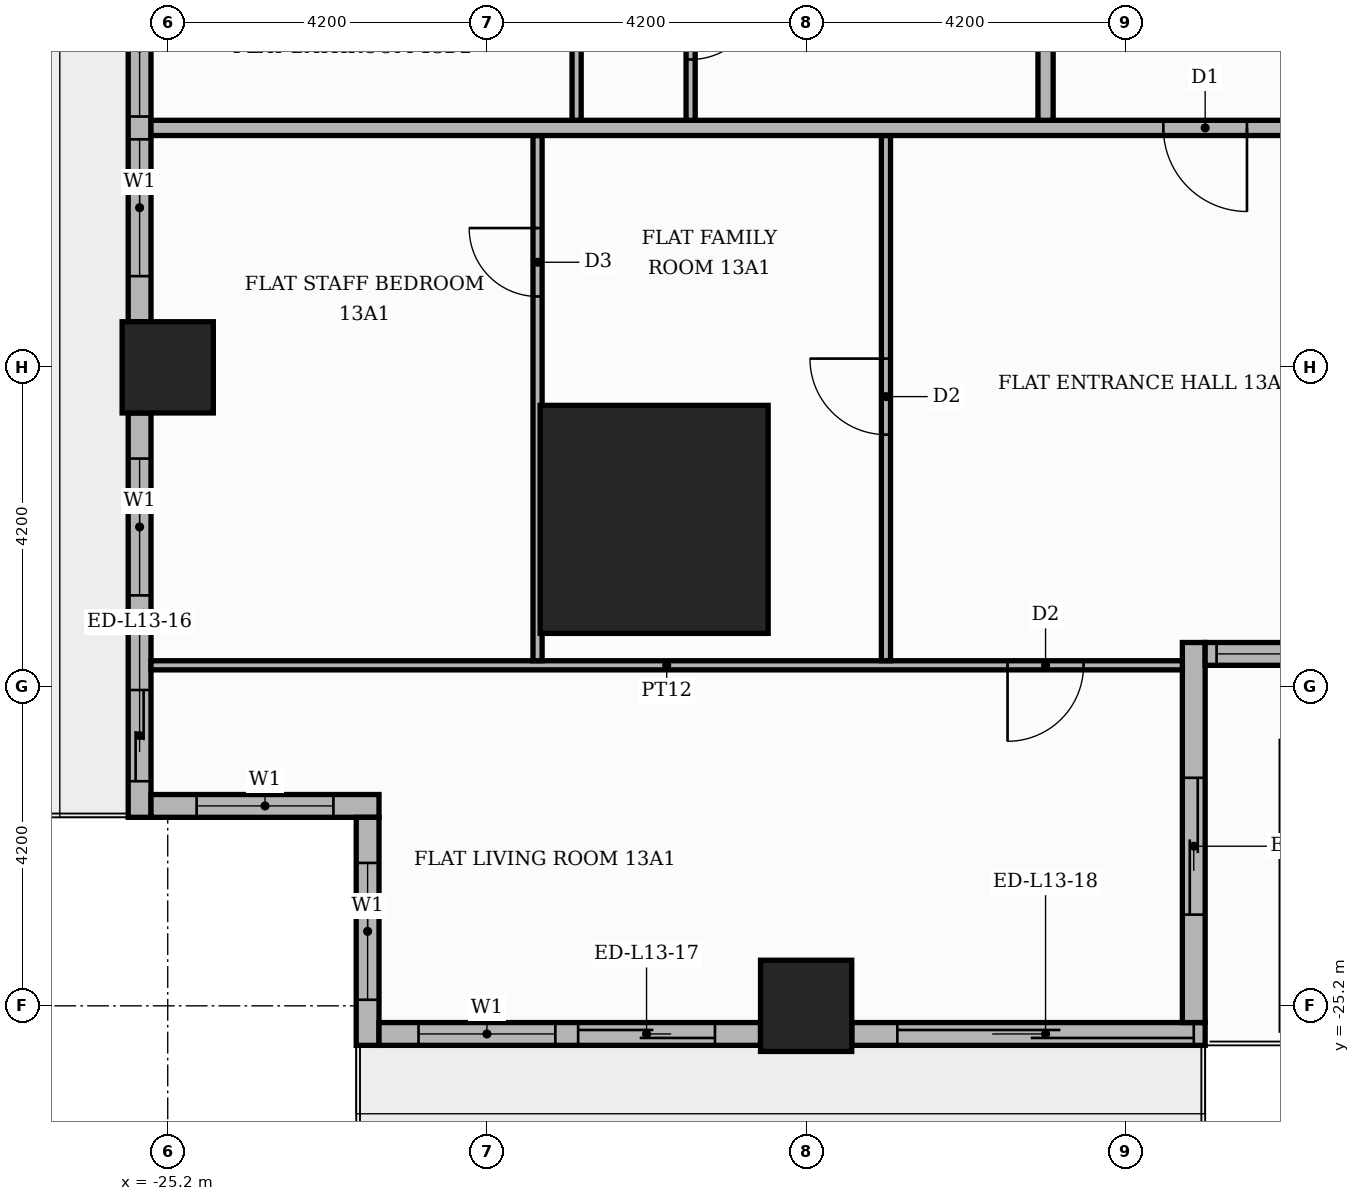
"""IFC4 building model, lengths in metres.
Left out: names, types, materials, properties, quantities, classifications, styles, units other than length and angle.
Written with IfcOpenShell. Run it as: python <this file> out.ifc"""

import sys

from ifc_helpers import new_model, si_unit, direction, frame, frame_2d, origin, origin_2d, place, context, subcontext, project, spatial, rectangle, extrude, element, fill, save


model = new_model("IFC4")
c1 = context("Model", 3, precision=1e-05, world=origin(), true_north=direction((0.0, 1.0)))
c2 = subcontext(c1, "Body", "Model", "MODEL_VIEW")
j1 = project(units=[si_unit("LENGTHUNIT", "METRE"), si_unit("PLANEANGLEUNIT", "RADIAN")], contexts=[c1])
p1 = place(None, origin())
s1 = spatial("IfcSite", under=j1, at=p1, CompositionType="ELEMENT")
p2 = place(p1, origin())
s2 = spatial("IfcBuilding", under=s1, at=p2, CompositionType="ELEMENT")
p3 = place(p2, frame((0.0, 0.0, 58.2)))
s3 = spatial("IfcBuildingStorey", under=s2, at=p3, CompositionType="ELEMENT", Elevation=58.2)
p4 = place(p3, frame((-18.8, -18.8, 0.0), z_axis=(0.0, 0.0, 1.0), x_axis=(1.0, 0.0, 0.0)))
e1 = element("IfcColumn", 1, at=p4, inside=s3, PredefinedType="COLUMN", context=c2, shape_type="SweptSolid", body=[
    extrude(rectangle(XDim=3.0, YDim=3.0, at=origin_2d()), origin(), (0.0, 0.0, 1.0), 3.9),
])
for number, where, z_axis, x_axis in (
    (2, (-16.8, -25.2, 0.0), (0.0, 0.0, 1.0), (1.0, 0.0, 0.0)),
    (3, (-25.2, -16.8, 0.0), (0.0, 0.0, 1.0), (1.0, 0.0, 0.0)),
):
    element("IfcColumn", number, at=place(p3, frame(where, z_axis=z_axis, x_axis=x_axis)), inside=s3, PredefinedType="COLUMN", context=c2, shape_type="SweptSolid", body=[
        extrude(rectangle(XDim=1.2, YDim=1.2, at=origin_2d()), origin(), (0.0, 0.0, 1.0), 3.9),
    ])
p5 = place(p3, frame((-25.57, -9.0, 0.0), z_axis=(0.0, 0.0, 1.0), x_axis=(0.0, -1.0, 0.0)))
e4 = element("IfcWall", 4, at=p5, inside=s3, PredefinedType="STANDARD", context=c2, shape_type="SweptSolid", body=[
    extrude(rectangle(XDim=7.2, YDim=0.3, at=frame_2d((3.6, 0.0))), origin(), (0.0, 0.0, 1.0), 3.48),
])
p6 = place(p5, frame((0.6, 0.0, 0.9)))
e5 = element("IfcOpeningElement", 5, at=p6, cuts=e4, PredefinedType="OPENING", context=c2, shape_type="SweptSolid", body=[
    extrude(rectangle(XDim=1.8, YDim=2.1, at=frame_2d((0.9, 1.05))), frame((0.0, 0.16, 0.0), z_axis=(0.0, -1.0, 0.0), x_axis=(1.0, 0.0, 0.0)), (0.0, 0.0, 1.0), 0.32),
])
p7 = place(p5, frame((2.7, 0.0, 0.9)))
e6 = element("IfcOpeningElement", 6, at=p7, cuts=e4, PredefinedType="OPENING", context=c2, shape_type="SweptSolid", body=[
    extrude(rectangle(XDim=1.8, YDim=2.1, at=frame_2d((0.9, 1.05))), frame((0.0, 0.16, 0.0), z_axis=(0.0, -1.0, 0.0), x_axis=(1.0, 0.0, 0.0)), (0.0, 0.0, 1.0), 0.32),
])
p8 = place(p5, frame((4.8, 0.0, 0.9)))
e7 = element("IfcOpeningElement", 7, at=p8, cuts=e4, PredefinedType="OPENING", context=c2, shape_type="SweptSolid", body=[
    extrude(rectangle(XDim=1.8, YDim=2.1, at=frame_2d((0.9, 1.05))), frame((0.0, 0.16, 0.0), z_axis=(0.0, -1.0, 0.0), x_axis=(1.0, 0.0, 0.0)), (0.0, 0.0, 1.0), 0.32),
])
p9 = place(p3, frame((-25.57, -17.4, 0.0), z_axis=(0.0, 0.0, 1.0), x_axis=(0.0, -1.0, 0.0)))
e8 = element("IfcWall", 8, at=p9, inside=s3, PredefinedType="STANDARD", context=c2, shape_type="SweptSolid", body=[
    extrude(rectangle(XDim=5.32, YDim=0.3, at=frame_2d((2.66, 0.0))), origin(), (0.0, 0.0, 1.0), 3.48),
])
p10 = place(p9, frame((0.6, 0.0, 0.9)))
e9 = element("IfcOpeningElement", 9, at=p10, cuts=e8, PredefinedType="OPENING", context=c2, shape_type="SweptSolid", body=[
    extrude(rectangle(XDim=1.8, YDim=2.1, at=frame_2d((0.9, 1.05))), frame((0.0, 0.16, 0.0), z_axis=(0.0, -1.0, 0.0), x_axis=(1.0, 0.0, 0.0)), (0.0, 0.0, 1.0), 0.32),
])
p11 = place(p9, frame((3.645, 0.0, 0.0)))
e10 = element("IfcOpeningElement", 10, at=p11, cuts=e8, PredefinedType="OPENING", context=c2, shape_type="SweptSolid", body=[
    extrude(rectangle(XDim=1.2, YDim=2.4, at=frame_2d((0.6, 1.2))), frame((0.0, 0.16, 0.0), z_axis=(0.0, -1.0, 0.0), x_axis=(1.0, 0.0, 0.0)), (0.0, 0.0, 1.0), 0.32),
])
p12 = place(p3, frame((-25.42, -22.57, 0.0), z_axis=(0.0, 0.0, 1.0), x_axis=(1.0, 0.0, 0.0)))
e11 = element("IfcWall", 11, at=p12, inside=s3, PredefinedType="STANDARD", context=c2, shape_type="SweptSolid", body=[
    extrude(rectangle(XDim=3.0, YDim=0.3, at=frame_2d((1.5, 0.0))), origin(), (0.0, 0.0, 1.0), 3.48),
])
p13 = place(p12, frame((0.6, 0.0, 0.9)))
e12 = element("IfcOpeningElement", 12, at=p13, cuts=e11, PredefinedType="OPENING", context=c2, shape_type="SweptSolid", body=[
    extrude(rectangle(XDim=1.8, YDim=2.1, at=frame_2d((0.9, 1.05))), frame((0.0, 0.16, 0.0), z_axis=(0.0, -1.0, 0.0), x_axis=(1.0, 0.0, 0.0)), (0.0, 0.0, 1.0), 0.32),
])
p14 = place(p3, frame((-22.57, -22.72, 0.0), z_axis=(0.0, 0.0, 1.0), x_axis=(0.0, -1.0, 0.0)))
e13 = element("IfcWall", 13, at=p14, inside=s3, PredefinedType="STANDARD", context=c2, shape_type="SweptSolid", body=[
    extrude(rectangle(XDim=3.0, YDim=0.3, at=frame_2d((1.5, 0.0))), origin(), (0.0, 0.0, 1.0), 3.48),
])
p15 = place(p14, frame((0.6, 0.0, 0.9)))
e14 = element("IfcOpeningElement", 14, at=p15, cuts=e13, PredefinedType="OPENING", context=c2, shape_type="SweptSolid", body=[
    extrude(rectangle(XDim=1.8, YDim=2.1, at=frame_2d((0.9, 1.05))), frame((0.0, 0.16, 0.0), z_axis=(0.0, -1.0, 0.0), x_axis=(1.0, 0.0, 0.0)), (0.0, 0.0, 1.0), 0.32),
])
p16 = place(p3, frame((-22.42, -25.57, 0.0), z_axis=(0.0, 0.0, 1.0), x_axis=(1.0, 0.0, 0.0)))
e15 = element("IfcWall", 15, at=p16, inside=s3, PredefinedType="STANDARD", context=c2, shape_type="SweptSolid", body=[
    extrude(rectangle(XDim=5.02, YDim=0.3, at=frame_2d((2.51, 0.0))), origin(), (0.0, 0.0, 1.0), 3.48),
])
p17 = place(p16, frame((0.52, 0.0, 0.9)))
e16 = element("IfcOpeningElement", 16, at=p17, cuts=e15, PredefinedType="OPENING", context=c2, shape_type="SweptSolid", body=[
    extrude(rectangle(XDim=1.8, YDim=2.1, at=frame_2d((0.9, 1.05))), frame((0.0, 0.16, 0.0), z_axis=(0.0, -1.0, 0.0), x_axis=(1.0, 0.0, 0.0)), (0.0, 0.0, 1.0), 0.32),
])
p18 = place(p16, frame((2.62, 0.0, 0.0)))
e17 = element("IfcOpeningElement", 17, at=p18, cuts=e15, PredefinedType="OPENING", context=c2, shape_type="SweptSolid", body=[
    extrude(rectangle(XDim=1.8, YDim=2.4, at=frame_2d((0.9, 1.2))), frame((0.0, 0.16, 0.0), z_axis=(0.0, -1.0, 0.0), x_axis=(1.0, 0.0, 0.0)), (0.0, 0.0, 1.0), 0.32),
])
p19 = place(p3, frame((-16.2, -25.57, 0.0), z_axis=(0.0, 0.0, 1.0), x_axis=(1.0, 0.0, 0.0)))
e18 = element("IfcWall", 18, at=p19, inside=s3, PredefinedType="STANDARD", context=c2, shape_type="SweptSolid", body=[
    extrude(rectangle(XDim=4.65, YDim=0.3, at=frame_2d((2.325, 0.0))), origin(), (0.0, 0.0, 1.0), 3.48),
])
p20 = place(p19, frame((0.6, 0.0, 0.0)))
e19 = element("IfcOpeningElement", 19, at=p20, cuts=e18, PredefinedType="OPENING", context=c2, shape_type="SweptSolid", body=[
    extrude(rectangle(XDim=3.9, YDim=2.4, at=frame_2d((1.95, 1.2))), frame((0.0, 0.16, 0.0), z_axis=(0.0, -1.0, 0.0), x_axis=(1.0, 0.0, 0.0)), (0.0, 0.0, 1.0), 0.32),
])
p21 = place(p3, frame((-11.7, -25.42, 0.0), z_axis=(0.0, 0.0, 1.0), x_axis=(0.0, 1.0, 0.0)))
e20 = element("IfcWall", 20, at=p21, inside=s3, PredefinedType="STANDARD", context=c2, shape_type="SweptSolid", body=[
    extrude(rectangle(XDim=5.0, YDim=0.3, at=frame_2d((2.5, 0.0))), origin(), (0.0, 0.0, 1.0), 3.48),
])
p22 = place(p21, frame((1.42, 0.0, 0.0)))
e21 = element("IfcOpeningElement", 21, at=p22, cuts=e20, PredefinedType="OPENING", context=c2, shape_type="SweptSolid", body=[
    extrude(rectangle(XDim=1.8, YDim=2.4, at=frame_2d((0.9, 1.2))), frame((0.0, 0.16, 0.0), z_axis=(0.0, -1.0, 0.0), x_axis=(1.0, 0.0, 0.0)), (0.0, 0.0, 1.0), 0.32),
])
p23 = place(p3, frame((-11.55, -20.57, 0.0), z_axis=(0.0, 0.0, 1.0), x_axis=(1.0, 0.0, 0.0)))
e22 = element("IfcWall", 22, at=p23, inside=s3, PredefinedType="STANDARD", context=c2, shape_type="SweptSolid", body=[
    extrude(rectangle(XDim=23.4, YDim=0.3, at=frame_2d((11.7, 0.0))), origin(), (0.0, 0.0, 1.0), 3.48),
])
p24 = place(p23, frame((0.15, 0.0, 0.9)))
e23 = element("IfcOpeningElement", 23, at=p24, cuts=e22, PredefinedType="OPENING", context=c2, shape_type="SweptSolid", body=[
    extrude(rectangle(XDim=6.0, YDim=2.1, at=frame_2d((3.0, 1.05))), frame((0.0, 0.16, 0.0), z_axis=(0.0, -1.0, 0.0), x_axis=(1.0, 0.0, 0.0)), (0.0, 0.0, 1.0), 0.32),
])
p25 = place(p23, frame((6.45, 0.0, 0.9)))
e24 = element("IfcOpeningElement", 24, at=p25, cuts=e22, PredefinedType="OPENING", context=c2, shape_type="SweptSolid", body=[
    extrude(rectangle(XDim=6.0, YDim=2.1, at=frame_2d((3.0, 1.05))), frame((0.0, 0.16, 0.0), z_axis=(0.0, -1.0, 0.0), x_axis=(1.0, 0.0, 0.0)), (0.0, 0.0, 1.0), 0.32),
])
p26 = place(p23, frame((12.75, 0.0, 0.9)))
e25 = element("IfcOpeningElement", 25, at=p26, cuts=e22, PredefinedType="OPENING", context=c2, shape_type="SweptSolid", body=[
    extrude(rectangle(XDim=6.0, YDim=2.1, at=frame_2d((3.0, 1.05))), frame((0.0, 0.16, 0.0), z_axis=(0.0, -1.0, 0.0), x_axis=(1.0, 0.0, 0.0)), (0.0, 0.0, 1.0), 0.32),
])
p27 = place(p23, frame((19.05, 0.0, 0.9)))
e26 = element("IfcOpeningElement", 26, at=p27, cuts=e22, PredefinedType="OPENING", context=c2, shape_type="SweptSolid", body=[
    extrude(rectangle(XDim=3.9, YDim=2.1, at=frame_2d((1.95, 1.05))), frame((0.0, 0.16, 0.0), z_axis=(0.0, -1.0, 0.0), x_axis=(1.0, 0.0, 0.0)), (0.0, 0.0, 1.0), 0.32),
])
p28 = place(p3, frame((-25.42, -20.72, 0.0), z_axis=(0.0, 0.0, 1.0), x_axis=(1.0, 0.0, 0.0)))
e27 = element("IfcWall", 27, at=p28, inside=s3, PredefinedType="PARTITIONING", context=c2, shape_type="SweptSolid", body=[
    extrude(rectangle(XDim=13.57, YDim=0.12, at=frame_2d((6.785, 0.0))), origin(), (0.0, 0.0, 1.0), 3.48),
])
p29 = place(p28, frame((11.27, 0.0, 0.0)))
e28 = element("IfcOpeningElement", 28, at=p29, cuts=e27, PredefinedType="OPENING", context=c2, shape_type="SweptSolid", body=[
    extrude(rectangle(XDim=1.0, YDim=2.1, at=frame_2d((0.5, 1.05))), frame((0.0, 0.07, 0.0), z_axis=(0.0, -1.0, 0.0), x_axis=(1.0, 0.0, 0.0)), (0.0, 0.0, 1.0), 0.14),
])
p30 = place(p3, frame((-20.334, -20.66, 0.0), z_axis=(0.0, 0.0, 1.0), x_axis=(0.0, 1.0, 0.0)))
e29 = element("IfcWall", 29, at=p30, inside=s3, PredefinedType="PARTITIONING", context=c2, shape_type="SweptSolid", body=[
    extrude(rectangle(XDim=6.91, YDim=0.12, at=frame_2d((3.455, 0.0))), origin(), (0.0, 0.0, 1.0), 3.48),
])
p31 = place(p30, frame((4.792, 0.0, 0.0)))
e30 = element("IfcOpeningElement", 30, at=p31, cuts=e29, PredefinedType="OPENING", context=c2, shape_type="SweptSolid", body=[
    extrude(rectangle(XDim=0.9, YDim=2.1, at=frame_2d((0.45, 1.05))), frame((0.0, 0.07, 0.0), z_axis=(0.0, -1.0, 0.0), x_axis=(1.0, 0.0, 0.0)), (0.0, 0.0, 1.0), 0.14),
])
p32 = place(p3, frame((-15.75, -20.66, 0.0), z_axis=(0.0, 0.0, 1.0), x_axis=(0.0, 1.0, 0.0)))
e31 = element("IfcWall", 31, at=p32, inside=s3, PredefinedType="PARTITIONING", context=c2, shape_type="SweptSolid", body=[
    extrude(rectangle(XDim=6.91, YDim=0.12, at=frame_2d((3.455, 0.0))), origin(), (0.0, 0.0, 1.0), 3.48),
])
p33 = place(p32, frame((2.975, 0.0, 0.0)))
e32 = element("IfcOpeningElement", 32, at=p33, cuts=e31, PredefinedType="OPENING", context=c2, shape_type="SweptSolid", body=[
    extrude(rectangle(XDim=1.0, YDim=2.1, at=frame_2d((0.5, 1.05))), frame((0.0, 0.07, 0.0), z_axis=(0.0, -1.0, 0.0), x_axis=(1.0, 0.0, 0.0)), (0.0, 0.0, 1.0), 0.14),
])
p34 = place(p3, frame((-25.42, -13.65, 0.0), z_axis=(0.0, 0.0, 1.0), x_axis=(1.0, 0.0, 0.0)))
e33 = element("IfcWall", 33, at=p34, inside=s3, PredefinedType="PARTITIONING", context=c2, shape_type="SweptSolid", body=[
    extrude(rectangle(XDim=39.07, YDim=0.2, at=frame_2d((19.535, 0.0))), origin(), (0.0, 0.0, 1.0), 3.48),
])
p35 = place(p34, frame((13.32, 0.0, 0.0)))
e34 = element("IfcOpeningElement", 34, at=p35, cuts=e33, PredefinedType="OPENING", context=c2, shape_type="SweptSolid", body=[
    extrude(rectangle(XDim=1.1, YDim=2.4, at=frame_2d((0.55, 1.2))), frame((0.0, 0.11, 0.0), z_axis=(0.0, -1.0, 0.0), x_axis=(1.0, 0.0, 0.0)), (0.0, 0.0, 1.0), 0.22),
])
p36 = place(p34, frame((25.92, 0.0, 0.0)))
e35 = element("IfcOpeningElement", 35, at=p36, cuts=e33, PredefinedType="OPENING", context=c2, shape_type="SweptSolid", body=[
    extrude(rectangle(XDim=1.1, YDim=2.4, at=frame_2d((0.55, 1.2))), frame((0.0, 0.11, 0.0), z_axis=(0.0, -1.0, 0.0), x_axis=(1.0, 0.0, 0.0)), (0.0, 0.0, 1.0), 0.22),
])
p37 = place(p3, frame((-19.82, -13.55, 0.0), z_axis=(0.0, 0.0, 1.0), x_axis=(0.0, 1.0, 0.0)))
e36 = element("IfcWall", 36, at=p37, inside=s3, PredefinedType="PARTITIONING", context=c2, shape_type="SweptSolid", body=[
    extrude(rectangle(XDim=1.94, YDim=0.12, at=frame_2d((0.97, 0.0))), origin(), (0.0, 0.0, 1.0), 3.48),
])
p38 = place(p3, frame((-18.32, -13.55, 0.0), z_axis=(0.0, 0.0, 1.0), x_axis=(0.0, 1.0, 0.0)))
e37 = element("IfcWall", 37, at=p38, inside=s3, PredefinedType="PARTITIONING", context=c2, shape_type="SweptSolid", body=[
    extrude(rectangle(XDim=2.54, YDim=0.12, at=frame_2d((1.27, 0.0))), origin(), (0.0, 0.0, 1.0), 3.48),
])
p39 = place(p38, frame((0.8, 0.0, 0.0)))
e38 = element("IfcOpeningElement", 38, at=p39, cuts=e37, PredefinedType="OPENING", context=c2, shape_type="SweptSolid", body=[
    extrude(rectangle(XDim=0.9, YDim=2.1, at=frame_2d((0.45, 1.05))), frame((0.0, 0.07, 0.0), z_axis=(0.0, -1.0, 0.0), x_axis=(1.0, 0.0, 0.0)), (0.0, 0.0, 1.0), 0.14),
])
p40 = place(p3, frame((-13.65, -13.55, 0.0), z_axis=(0.0, 0.0, 1.0), x_axis=(0.0, 1.0, 0.0)))
e39 = element("IfcWall", 39, at=p40, inside=s3, PredefinedType="PARTITIONING", context=c2, shape_type="SweptSolid", body=[
    extrude(rectangle(XDim=18.7, YDim=0.2, at=frame_2d((9.35, 0.0))), origin(), (0.0, 0.0, 1.0), 3.48),
])
p41 = place(p40, frame((11.95, 0.0, 0.0)))
e40 = element("IfcOpeningElement", 40, at=p41, cuts=e39, PredefinedType="OPENING", context=c2, shape_type="SweptSolid", body=[
    extrude(rectangle(XDim=1.1, YDim=2.4, at=frame_2d((0.55, 1.2))), frame((0.0, 0.11, 0.0), z_axis=(0.0, -1.0, 0.0), x_axis=(1.0, 0.0, 0.0)), (0.0, 0.0, 1.0), 0.22),
])
p42 = place(p7, origin())
e41 = element("IfcWindow", 41, at=p42, inside=s3, PartitioningType="SINGLE_PANEL", PredefinedType="WINDOW", context=c2, shape_type="SweptSolid", body=[
    extrude(rectangle(XDim=1.8, YDim=2.1, at=frame_2d((0.9, 1.05))), frame((0.0, 0.03, 0.0), z_axis=(0.0, -1.0, 0.0), x_axis=(1.0, 0.0, 0.0)), (0.0, 0.0, 1.0), 0.06),
])
fill(e6, e41)
p43 = place(p8, origin())
e42 = element("IfcWindow", 42, at=p43, inside=s3, PartitioningType="SINGLE_PANEL", PredefinedType="WINDOW", context=c2, shape_type="SweptSolid", body=[
    extrude(rectangle(XDim=1.8, YDim=2.1, at=frame_2d((0.9, 1.05))), frame((0.0, 0.03, 0.0), z_axis=(0.0, -1.0, 0.0), x_axis=(1.0, 0.0, 0.0)), (0.0, 0.0, 1.0), 0.06),
])
fill(e7, e42)
p44 = place(p10, origin())
e43 = element("IfcWindow", 43, at=p44, inside=s3, PartitioningType="SINGLE_PANEL", PredefinedType="WINDOW", context=c2, shape_type="SweptSolid", body=[
    extrude(rectangle(XDim=1.8, YDim=2.1, at=frame_2d((0.9, 1.05))), frame((0.0, 0.03, 0.0), z_axis=(0.0, -1.0, 0.0), x_axis=(1.0, 0.0, 0.0)), (0.0, 0.0, 1.0), 0.06),
])
fill(e9, e43)
p45 = place(p11, origin())
e44 = element("IfcDoor", 44, at=p45, inside=s3, OperationType="SLIDING_TO_RIGHT", PredefinedType="DOOR", context=c2, shape_type="SweptSolid", body=[
    extrude(rectangle(XDim=1.2, YDim=2.4, at=frame_2d((0.6, 1.2))), frame((0.0, 0.025, 0.0), z_axis=(0.0, -1.0, 0.0), x_axis=(1.0, 0.0, 0.0)), (0.0, 0.0, 1.0), 0.05),
])
fill(e10, e44)
p46 = place(p13, origin())
e45 = element("IfcWindow", 45, at=p46, inside=s3, PartitioningType="SINGLE_PANEL", PredefinedType="WINDOW", context=c2, shape_type="SweptSolid", body=[
    extrude(rectangle(XDim=1.8, YDim=2.1, at=frame_2d((0.9, 1.05))), frame((0.0, 0.03, 0.0), z_axis=(0.0, -1.0, 0.0), x_axis=(1.0, 0.0, 0.0)), (0.0, 0.0, 1.0), 0.06),
])
fill(e12, e45)
p47 = place(p15, origin())
e46 = element("IfcWindow", 46, at=p47, inside=s3, PartitioningType="SINGLE_PANEL", PredefinedType="WINDOW", context=c2, shape_type="SweptSolid", body=[
    extrude(rectangle(XDim=1.8, YDim=2.1, at=frame_2d((0.9, 1.05))), frame((0.0, 0.03, 0.0), z_axis=(0.0, -1.0, 0.0), x_axis=(1.0, 0.0, 0.0)), (0.0, 0.0, 1.0), 0.06),
])
fill(e14, e46)
p48 = place(p17, origin())
e47 = element("IfcWindow", 47, at=p48, inside=s3, PartitioningType="SINGLE_PANEL", PredefinedType="WINDOW", context=c2, shape_type="SweptSolid", body=[
    extrude(rectangle(XDim=1.8, YDim=2.1, at=frame_2d((0.9, 1.05))), frame((0.0, 0.03, 0.0), z_axis=(0.0, -1.0, 0.0), x_axis=(1.0, 0.0, 0.0)), (0.0, 0.0, 1.0), 0.06),
])
fill(e16, e47)
p49 = place(p18, origin())
e48 = element("IfcDoor", 48, at=p49, inside=s3, OperationType="SLIDING_TO_RIGHT", PredefinedType="DOOR", context=c2, shape_type="SweptSolid", body=[
    extrude(rectangle(XDim=1.8, YDim=2.4, at=frame_2d((0.9, 1.2))), frame((0.0, 0.025, 0.0), z_axis=(0.0, -1.0, 0.0), x_axis=(1.0, 0.0, 0.0)), (0.0, 0.0, 1.0), 0.05),
])
fill(e17, e48)
p50 = place(p20, origin())
e49 = element("IfcDoor", 49, at=p50, inside=s3, OperationType="SLIDING_TO_LEFT", PredefinedType="DOOR", context=c2, shape_type="SweptSolid", body=[
    extrude(rectangle(XDim=3.9, YDim=2.4, at=frame_2d((1.95, 1.2))), frame((0.0, 0.025, 0.0), z_axis=(0.0, -1.0, 0.0), x_axis=(1.0, 0.0, 0.0)), (0.0, 0.0, 1.0), 0.05),
])
fill(e19, e49)
p51 = place(p22, origin())
e50 = element("IfcDoor", 50, at=p51, inside=s3, OperationType="SLIDING_TO_LEFT", PredefinedType="DOOR", context=c2, shape_type="SweptSolid", body=[
    extrude(rectangle(XDim=1.8, YDim=2.4, at=frame_2d((0.9, 1.2))), frame((0.0, 0.025, 0.0), z_axis=(0.0, -1.0, 0.0), x_axis=(1.0, 0.0, 0.0)), (0.0, 0.0, 1.0), 0.05),
])
fill(e21, e50)
p52 = place(p24, origin())
e51 = element("IfcWindow", 51, at=p52, inside=s3, PartitioningType="SINGLE_PANEL", PredefinedType="WINDOW", context=c2, shape_type="SweptSolid", body=[
    extrude(rectangle(XDim=6.0, YDim=2.1, at=frame_2d((3.0, 1.05))), frame((0.0, 0.03, 0.0), z_axis=(0.0, -1.0, 0.0), x_axis=(1.0, 0.0, 0.0)), (0.0, 0.0, 1.0), 0.06),
])
fill(e23, e51)
p53 = place(p35, frame((1.1, 0.0, 0.0), z_axis=(0.0, 0.0, 1.0), x_axis=(-1.0, 0.0, 0.0)))
e52 = element("IfcDoor", 52, at=p53, inside=s3, OperationType="SINGLE_SWING_RIGHT", PredefinedType="DOOR", context=c2, shape_type="SweptSolid", body=[
    extrude(rectangle(XDim=1.1, YDim=2.4, at=frame_2d((0.55, 1.2))), frame((0.0, 0.025, 0.0), z_axis=(0.0, -1.0, 0.0), x_axis=(1.0, 0.0, 0.0)), (0.0, 0.0, 1.0), 0.05),
])
fill(e34, e52)
p54 = place(p31, origin())
e53 = element("IfcDoor", 53, at=p54, inside=s3, OperationType="SINGLE_SWING_RIGHT", PredefinedType="DOOR", context=c2, shape_type="SweptSolid", body=[
    extrude(rectangle(XDim=0.9, YDim=2.1, at=frame_2d((0.45, 1.05))), frame((0.0, 0.025, 0.0), z_axis=(0.0, -1.0, 0.0), x_axis=(1.0, 0.0, 0.0)), (0.0, 0.0, 1.0), 0.05),
])
fill(e30, e53)
p55 = place(p33, origin())
e54 = element("IfcDoor", 54, at=p55, inside=s3, OperationType="SINGLE_SWING_RIGHT", PredefinedType="DOOR", context=c2, shape_type="SweptSolid", body=[
    extrude(rectangle(XDim=1.0, YDim=2.1, at=frame_2d((0.5, 1.05))), frame((0.0, 0.025, 0.0), z_axis=(0.0, -1.0, 0.0), x_axis=(1.0, 0.0, 0.0)), (0.0, 0.0, 1.0), 0.05),
])
fill(e32, e54)
p56 = place(p29, frame((1.0, 0.0, 0.0), z_axis=(0.0, 0.0, 1.0), x_axis=(-1.0, 0.0, 0.0)))
e55 = element("IfcDoor", 55, at=p56, inside=s3, OperationType="SINGLE_SWING_LEFT", PredefinedType="DOOR", context=c2, shape_type="SweptSolid", body=[
    extrude(rectangle(XDim=1.0, YDim=2.1, at=frame_2d((0.5, 1.05))), frame((0.0, 0.025, 0.0), z_axis=(0.0, -1.0, 0.0), x_axis=(1.0, 0.0, 0.0)), (0.0, 0.0, 1.0), 0.05),
])
fill(e28, e55)
p57 = place(p39, frame((0.9, 0.0, 0.0), z_axis=(0.0, 0.0, 1.0), x_axis=(-1.0, 0.0, 0.0)))
e56 = element("IfcDoor", 56, at=p57, inside=s3, OperationType="SINGLE_SWING_RIGHT", PredefinedType="DOOR", context=c2, shape_type="SweptSolid", body=[
    extrude(rectangle(XDim=0.9, YDim=2.1, at=frame_2d((0.45, 1.05))), frame((0.0, 0.025, 0.0), z_axis=(0.0, -1.0, 0.0), x_axis=(1.0, 0.0, 0.0)), (0.0, 0.0, 1.0), 0.05),
])
fill(e38, e56)
save(model, sys.argv[1])
